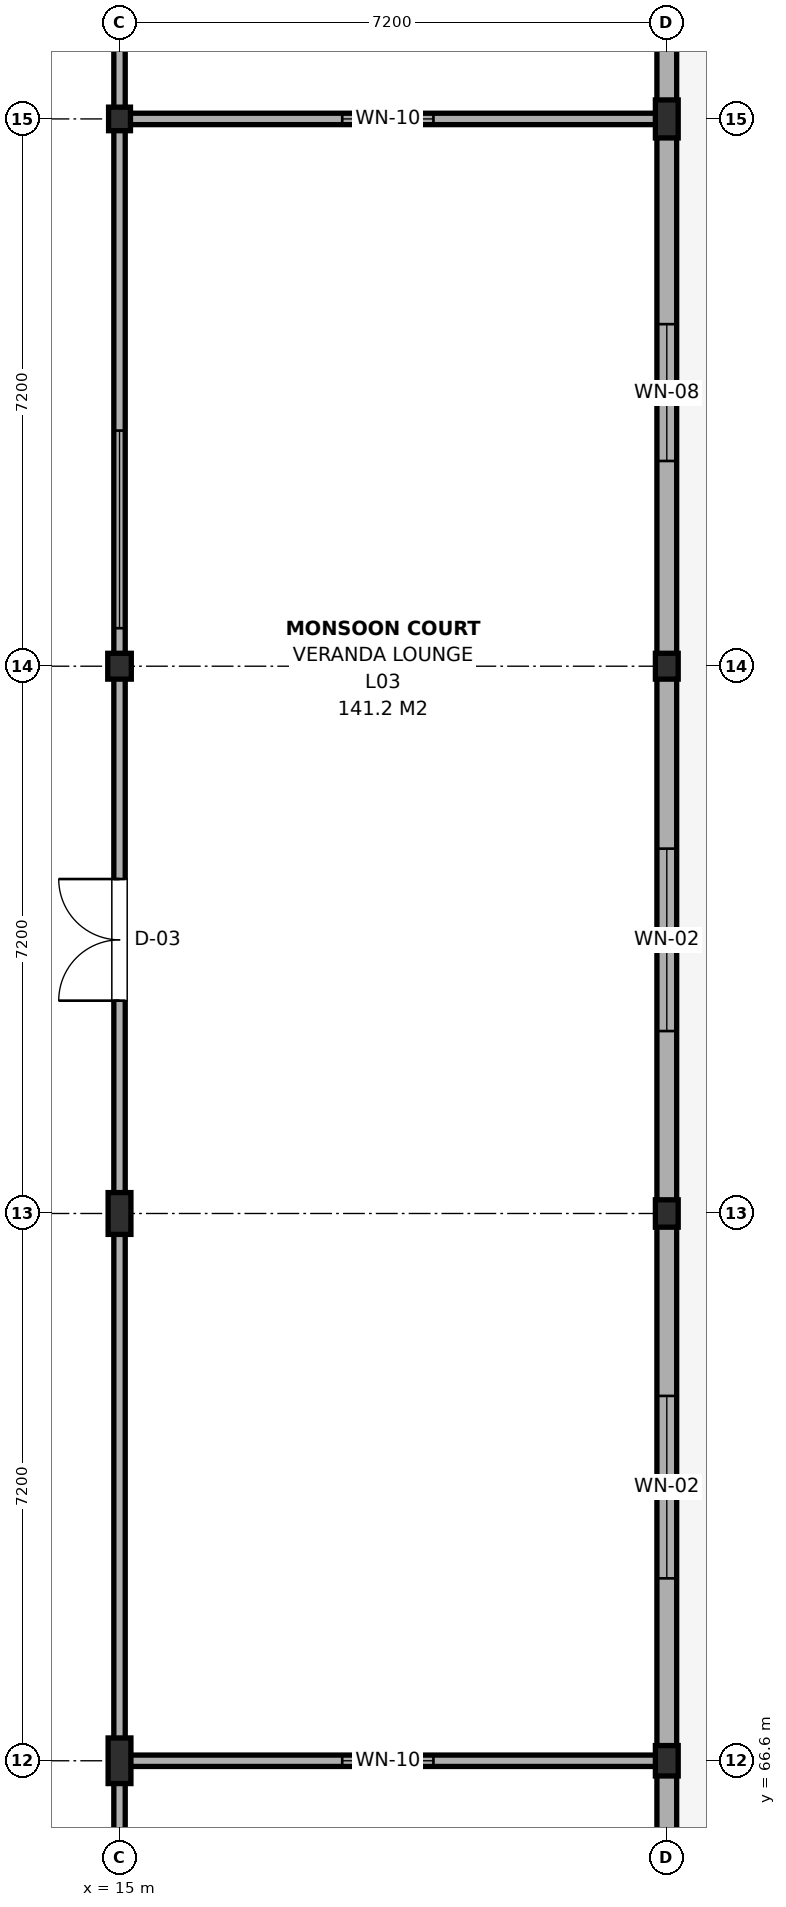
"""IFC4 building model, lengths in metres.
Left out: names, types, materials, properties, quantities, classifications, styles, units other than length and angle.
Written with IfcOpenShell. Run it as: python <this file> out.ifc"""

import sys

from ifc_helpers import new_model, si_unit, direction, frame, frame_2d, origin, origin_2d, place, context, subcontext, project, spatial, rectangle, i_section, extrude, element, fill, save


model = new_model("IFC4")
c1 = context("Model", 3, precision=1e-05, world=origin(), true_north=direction((0.0, 1.0)))
c2 = subcontext(c1, "Body", "Model", "MODEL_VIEW")
j1 = project(units=[si_unit("LENGTHUNIT", "METRE"), si_unit("PLANEANGLEUNIT", "RADIAN")], contexts=[c1])
p1 = place(None, origin())
s1 = spatial("IfcSite", under=j1, at=p1, CompositionType="ELEMENT")
p2 = place(p1, origin())
s2 = spatial("IfcBuilding", under=s1, at=p2, CompositionType="ELEMENT")
p3 = place(p2, frame((0.0, 0.0, 13.2)))
s3 = spatial("IfcBuildingStorey", under=s2, at=p3, CompositionType="ELEMENT", Elevation=13.2)
p4 = place(p3, frame((15.0, 66.6, 0.0), z_axis=(0.0, 0.0, 1.0), x_axis=(1.0, 0.0, 0.0)))
e1 = element("IfcColumn", 1, at=p4, inside=s3, PredefinedType="COLUMN", context=c2, shape_type="SweptSolid", body=[
    extrude(i_section(OverallWidth=0.3, OverallDepth=0.6, WebThickness=0.015, FlangeThickness=0.03, FilletRadius=0.027, at=origin_2d()), origin(), (0.0, 0.0, 1.0), 3.9),
])
p5 = place(p3, frame((15.0, 73.8, 0.0), z_axis=(0.0, 0.0, 1.0), x_axis=(1.0, 0.0, 0.0)))
e2 = element("IfcColumn", 2, at=p5, inside=s3, PredefinedType="COLUMN", context=c2, shape_type="SweptSolid", body=[
    extrude(i_section(OverallWidth=0.3, OverallDepth=0.55, WebThickness=0.015, FlangeThickness=0.029, FilletRadius=0.027, at=origin_2d()), origin(), (0.0, 0.0, 1.0), 3.9),
])
p6 = place(p3, frame((15.0, 81.0, 0.0), z_axis=(0.0, 0.0, 1.0), x_axis=(1.0, 0.0, 0.0)))
e3 = element("IfcColumn", 3, at=p6, inside=s3, PredefinedType="COLUMN", context=c2, shape_type="SweptSolid", body=[
    extrude(i_section(OverallWidth=0.31, OverallDepth=0.34, WebThickness=0.021, FlangeThickness=0.039, FilletRadius=0.027, at=origin_2d()), origin(), (0.0, 0.0, 1.0), 3.9),
])
p7 = place(p3, frame((15.0, 88.2, 0.0), z_axis=(0.0, 0.0, 1.0), x_axis=(1.0, 0.0, 0.0)))
e4 = element("IfcColumn", 4, at=p7, inside=s3, PredefinedType="COLUMN", context=c2, shape_type="SweptSolid", body=[
    extrude(i_section(OverallWidth=0.288, OverallDepth=0.31, WebThickness=0.019, FlangeThickness=0.033, FilletRadius=0.024, at=origin_2d()), origin(), (0.0, 0.0, 1.0), 3.9),
])
p8 = place(p3, frame((22.2, 66.6, 0.0), z_axis=(0.0, 0.0, 1.0), x_axis=(1.0, 0.0, 0.0)))
e5 = element("IfcColumn", 5, at=p8, inside=s3, PredefinedType="COLUMN", context=c2, shape_type="SweptSolid", body=[
    extrude(i_section(OverallWidth=0.3, OverallDepth=0.4, WebThickness=0.013, FlangeThickness=0.024, FilletRadius=0.027, at=origin_2d()), origin(), (0.0, 0.0, 1.0), 3.9),
])
p9 = place(p3, frame((22.2, 73.8, 0.0), z_axis=(0.0, 0.0, 1.0), x_axis=(1.0, 0.0, 0.0)))
e6 = element("IfcColumn", 6, at=p9, inside=s3, PredefinedType="COLUMN", context=c2, shape_type="SweptSolid", body=[
    extrude(i_section(OverallWidth=0.3, OverallDepth=0.36, WebThickness=0.012, FlangeThickness=0.022, FilletRadius=0.027, at=origin_2d()), origin(), (0.0, 0.0, 1.0), 3.9),
])
p10 = place(p3, frame((22.2, 81.0, 0.0), z_axis=(0.0, 0.0, 1.0), x_axis=(1.0, 0.0, 0.0)))
e7 = element("IfcColumn", 7, at=p10, inside=s3, PredefinedType="COLUMN", context=c2, shape_type="SweptSolid", body=[
    extrude(i_section(OverallWidth=0.3, OverallDepth=0.34, WebThickness=0.012, FlangeThickness=0.021, FilletRadius=0.027, at=origin_2d()), origin(), (0.0, 0.0, 1.0), 3.9),
])
p11 = place(p3, frame((22.2, 88.2, 0.0), z_axis=(0.0, 0.0, 1.0), x_axis=(1.0, 0.0, 0.0)))
e8 = element("IfcColumn", 8, at=p11, inside=s3, PredefinedType="COLUMN", context=c2, shape_type="SweptSolid", body=[
    extrude(i_section(OverallWidth=0.3, OverallDepth=0.5, WebThickness=0.014, FlangeThickness=0.028, FilletRadius=0.027, at=origin_2d()), origin(), (0.0, 0.0, 1.0), 3.9),
])
p12 = place(p3, frame((22.2, 58.8, 0.0), z_axis=(0.0, 0.0, 1.0), x_axis=(0.0, 1.0, 0.0)))
e9 = element("IfcWall", 9, at=p12, inside=s3, PredefinedType="SOLIDWALL", context=c2, shape_type="SweptSolid", body=[
    extrude(rectangle(XDim=7.8, YDim=0.26, at=frame_2d((3.9, 0.0))), origin(), (0.0, 0.0, 1.0), 3.145),
])
p13 = place(p12, frame((3.0, 0.0, 0.65)))
e10 = element("IfcOpeningElement", 10, at=p13, cuts=e9, PredefinedType="OPENING", context=c2, shape_type="SweptSolid", body=[
    extrude(rectangle(XDim=1.8, YDim=1.2, at=frame_2d((0.9, 0.6))), frame((0.0, 0.145, 0.0), z_axis=(0.0, -1.0, 0.0), x_axis=(1.0, 0.0, 0.0)), (0.0, 0.0, 1.0), 0.29),
])
p14 = place(p3, frame((22.2, 66.6, 0.0), z_axis=(0.0, 0.0, 1.0), x_axis=(0.0, 1.0, 0.0)))
e11 = element("IfcWall", 11, at=p14, inside=s3, PredefinedType="SOLIDWALL", context=c2, shape_type="SweptSolid", body=[
    extrude(rectangle(XDim=7.2, YDim=0.26, at=frame_2d((3.6, 0.0))), origin(), (0.0, 0.0, 1.0), 3.195),
])
p15 = place(p14, frame((2.4, 0.0, 0.9)))
e12 = element("IfcOpeningElement", 12, at=p15, cuts=e11, PredefinedType="OPENING", context=c2, shape_type="SweptSolid", body=[
    extrude(rectangle(XDim=2.4, YDim=2.1, at=frame_2d((1.2, 1.05))), frame((0.0, 0.145, 0.0), z_axis=(0.0, -1.0, 0.0), x_axis=(1.0, 0.0, 0.0)), (0.0, 0.0, 1.0), 0.29),
])
p16 = place(p3, frame((22.2, 73.8, 0.0), z_axis=(0.0, 0.0, 1.0), x_axis=(0.0, 1.0, 0.0)))
e13 = element("IfcWall", 13, at=p16, inside=s3, PredefinedType="SOLIDWALL", context=c2, shape_type="SweptSolid", body=[
    extrude(rectangle(XDim=7.2, YDim=0.26, at=frame_2d((3.6, 0.0))), origin(), (0.0, 0.0, 1.0), 3.245),
])
p17 = place(p16, frame((2.4, 0.0, 0.9)))
e14 = element("IfcOpeningElement", 14, at=p17, cuts=e13, PredefinedType="OPENING", context=c2, shape_type="SweptSolid", body=[
    extrude(rectangle(XDim=2.4, YDim=2.1, at=frame_2d((1.2, 1.05))), frame((0.0, 0.145, 0.0), z_axis=(0.0, -1.0, 0.0), x_axis=(1.0, 0.0, 0.0)), (0.0, 0.0, 1.0), 0.29),
])
p18 = place(p3, frame((22.2, 81.0, 0.0), z_axis=(0.0, 0.0, 1.0), x_axis=(0.0, 1.0, 0.0)))
e15 = element("IfcWall", 15, at=p18, inside=s3, PredefinedType="SOLIDWALL", context=c2, shape_type="SweptSolid", body=[
    extrude(rectangle(XDim=7.2, YDim=0.26, at=frame_2d((3.6, 0.0))), origin(), (0.0, 0.0, 1.0), 3.095),
])
p19 = place(p18, frame((2.7, 0.0, 0.65)))
e16 = element("IfcOpeningElement", 16, at=p19, cuts=e15, PredefinedType="OPENING", context=c2, shape_type="SweptSolid", body=[
    extrude(rectangle(XDim=1.8, YDim=1.2, at=frame_2d((0.9, 0.6))), frame((0.0, 0.145, 0.0), z_axis=(0.0, -1.0, 0.0), x_axis=(1.0, 0.0, 0.0)), (0.0, 0.0, 1.0), 0.29),
])
p20 = place(p3, frame((22.2, 88.2, 0.0), z_axis=(0.0, 0.0, 1.0), x_axis=(0.0, 1.0, 0.0)))
e17 = element("IfcWall", 17, at=p20, inside=s3, PredefinedType="SOLIDWALL", context=c2, shape_type="SweptSolid", body=[
    extrude(rectangle(XDim=7.8, YDim=0.26, at=frame_2d((3.9, 0.0))), origin(), (0.0, 0.0, 1.0), 3.095),
])
p21 = place(p20, frame((3.0, 0.0, 0.65)))
e18 = element("IfcOpeningElement", 18, at=p21, cuts=e17, PredefinedType="OPENING", context=c2, shape_type="SweptSolid", body=[
    extrude(rectangle(XDim=1.8, YDim=1.2, at=frame_2d((0.9, 0.6))), frame((0.0, 0.145, 0.0), z_axis=(0.0, -1.0, 0.0), x_axis=(1.0, 0.0, 0.0)), (0.0, 0.0, 1.0), 0.29),
])
p22 = place(p3, frame((15.0, 42.0, 0.0), z_axis=(0.0, 0.0, 1.0), x_axis=(0.0, 1.0, 0.0)))
e19 = element("IfcWall", 19, at=p22, inside=s3, PredefinedType="PARTITIONING", context=c2, shape_type="SweptSolid", body=[
    extrude(rectangle(XDim=24.6, YDim=0.15, at=frame_2d((12.3, 0.0))), origin(), (0.0, 0.0, 1.0), 3.095),
])
p23 = place(p22, frame((11.5, 0.0, 0.0)))
e20 = element("IfcOpeningElement", 20, at=p23, cuts=e19, PredefinedType="OPENING", context=c2, shape_type="SweptSolid", body=[
    extrude(rectangle(XDim=1.6, YDim=2.15, at=frame_2d((0.8, 1.075))), frame((0.0, 0.09, 0.0), z_axis=(0.0, -1.0, 0.0), x_axis=(1.0, 0.0, 0.0)), (0.0, 0.0, 1.0), 0.18),
])
p24 = place(p3, frame((15.0, 66.6, 0.0), z_axis=(0.0, 0.0, 1.0), x_axis=(0.0, 1.0, 0.0)))
e21 = element("IfcWall", 21, at=p24, inside=s3, PredefinedType="PARTITIONING", context=c2, shape_type="SweptSolid", body=[
    extrude(rectangle(XDim=21.6, YDim=0.15, at=frame_2d((10.8, 0.0))), origin(), (0.0, 0.0, 1.0), 3.095),
])
p25 = place(p24, frame((10.0, 0.0, 0.0)))
e22 = element("IfcOpeningElement", 22, at=p25, cuts=e21, PredefinedType="OPENING", context=c2, shape_type="SweptSolid", body=[
    extrude(rectangle(XDim=1.6, YDim=2.15, at=frame_2d((0.8, 1.075))), frame((0.0, 0.09, 0.0), z_axis=(0.0, -1.0, 0.0), x_axis=(1.0, 0.0, 0.0)), (0.0, 0.0, 1.0), 0.18),
])
p26 = place(p24, frame((14.9, 0.0, 0.95)))
e23 = element("IfcOpeningElement", 23, at=p26, cuts=e21, PredefinedType="OPENING", context=c2, shape_type="SweptSolid", body=[
    extrude(rectangle(XDim=2.6, YDim=1.5, at=frame_2d((1.3, 0.75))), frame((0.0, 0.09, 0.0), z_axis=(0.0, -1.0, 0.0), x_axis=(1.0, 0.0, 0.0)), (0.0, 0.0, 1.0), 0.18),
])
p27 = place(p3, frame((15.0, 66.6, 0.0), z_axis=(0.0, 0.0, 1.0), x_axis=(1.0, 0.0, 0.0)))
e24 = element("IfcWall", 24, at=p27, inside=s3, PredefinedType="PARTITIONING", context=c2, shape_type="SweptSolid", body=[
    extrude(rectangle(XDim=7.06, YDim=0.15, at=frame_2d((3.53, 0.0))), origin(), (0.0, 0.0, 1.0), 3.145),
])
p28 = place(p27, frame((2.93, 0.0, 0.95)))
e25 = element("IfcOpeningElement", 25, at=p28, cuts=e24, PredefinedType="OPENING", context=c2, shape_type="SweptSolid", body=[
    extrude(rectangle(XDim=1.2, YDim=1.5, at=frame_2d((0.6, 0.75))), frame((0.0, 0.09, 0.0), z_axis=(0.0, -1.0, 0.0), x_axis=(1.0, 0.0, 0.0)), (0.0, 0.0, 1.0), 0.18),
])
p29 = place(p3, frame((15.0, 88.2, 0.0), z_axis=(0.0, 0.0, 1.0), x_axis=(0.0, 1.0, 0.0)))
e26 = element("IfcWall", 26, at=p29, inside=s3, PredefinedType="PARTITIONING", context=c2, shape_type="SweptSolid", body=[
    extrude(rectangle(XDim=25.2, YDim=0.15, at=frame_2d((12.6, 0.0))), origin(), (0.0, 0.0, 1.0), 3.105),
])
p30 = place(p29, frame((12.075, 0.0, 0.0)))
e27 = element("IfcOpeningElement", 27, at=p30, cuts=e26, PredefinedType="OPENING", context=c2, shape_type="SweptSolid", body=[
    extrude(rectangle(XDim=1.05, YDim=2.15, at=frame_2d((0.525, 1.075))), frame((0.0, 0.09, 0.0), z_axis=(0.0, -1.0, 0.0), x_axis=(1.0, 0.0, 0.0)), (0.0, 0.0, 1.0), 0.18),
])
p31 = place(p29, frame((17.6, 0.0, 0.95)))
e28 = element("IfcOpeningElement", 28, at=p31, cuts=e26, PredefinedType="OPENING", context=c2, shape_type="SweptSolid", body=[
    extrude(rectangle(XDim=2.6, YDim=1.5, at=frame_2d((1.3, 0.75))), frame((0.0, 0.09, 0.0), z_axis=(0.0, -1.0, 0.0), x_axis=(1.0, 0.0, 0.0)), (0.0, 0.0, 1.0), 0.18),
])
p32 = place(p3, frame((15.0, 88.2, 0.0), z_axis=(0.0, 0.0, 1.0), x_axis=(1.0, 0.0, 0.0)))
e29 = element("IfcWall", 29, at=p32, inside=s3, PredefinedType="PARTITIONING", context=c2, shape_type="SweptSolid", body=[
    extrude(rectangle(XDim=7.06, YDim=0.15, at=frame_2d((3.53, 0.0))), origin(), (0.0, 0.0, 1.0), 3.145),
])
p33 = place(p32, frame((2.93, 0.0, 0.95)))
e30 = element("IfcOpeningElement", 30, at=p33, cuts=e29, PredefinedType="OPENING", context=c2, shape_type="SweptSolid", body=[
    extrude(rectangle(XDim=1.2, YDim=1.5, at=frame_2d((0.6, 0.75))), frame((0.0, 0.09, 0.0), z_axis=(0.0, -1.0, 0.0), x_axis=(1.0, 0.0, 0.0)), (0.0, 0.0, 1.0), 0.18),
])
p34 = place(p15, origin())
e31 = element("IfcWindow", 31, at=p34, inside=s3, PartitioningType="SINGLE_PANEL", PredefinedType="WINDOW", context=c2, shape_type="SweptSolid", body=[
    extrude(rectangle(XDim=2.4, YDim=2.1, at=frame_2d((1.2, 1.05))), frame((0.0, 0.03, 0.0), z_axis=(0.0, -1.0, 0.0), x_axis=(1.0, 0.0, 0.0)), (0.0, 0.0, 1.0), 0.06),
])
fill(e12, e31)
p35 = place(p17, origin())
e32 = element("IfcWindow", 32, at=p35, inside=s3, PartitioningType="SINGLE_PANEL", PredefinedType="WINDOW", context=c2, shape_type="SweptSolid", body=[
    extrude(rectangle(XDim=2.4, YDim=2.1, at=frame_2d((1.2, 1.05))), frame((0.0, 0.03, 0.0), z_axis=(0.0, -1.0, 0.0), x_axis=(1.0, 0.0, 0.0)), (0.0, 0.0, 1.0), 0.06),
])
fill(e14, e32)
p36 = place(p19, origin())
e33 = element("IfcWindow", 33, at=p36, inside=s3, PartitioningType="SINGLE_PANEL", PredefinedType="WINDOW", context=c2, shape_type="SweptSolid", body=[
    extrude(rectangle(XDim=1.8, YDim=1.2, at=frame_2d((0.9, 0.6))), frame((0.0, 0.03, 0.0), z_axis=(0.0, -1.0, 0.0), x_axis=(1.0, 0.0, 0.0)), (0.0, 0.0, 1.0), 0.06),
])
fill(e16, e33)
p37 = place(p25, origin())
e34 = element("IfcDoor", 34, at=p37, inside=s3, OperationType="DOUBLE_DOOR_SINGLE_SWING", PredefinedType="DOOR", context=c2, shape_type="SweptSolid", body=[
    extrude(rectangle(XDim=1.6, YDim=2.15, at=frame_2d((0.8, 1.075))), frame((0.0, 0.025, 0.0), z_axis=(0.0, -1.0, 0.0), x_axis=(1.0, 0.0, 0.0)), (0.0, 0.0, 1.0), 0.05),
])
fill(e22, e34)
p38 = place(p26, origin())
e35 = element("IfcWindow", 35, at=p38, inside=s3, PartitioningType="SINGLE_PANEL", PredefinedType="WINDOW", context=c2, shape_type="SweptSolid", body=[
    extrude(rectangle(XDim=2.6, YDim=1.5, at=frame_2d((1.3, 0.75))), frame((0.0, 0.03, 0.0), z_axis=(0.0, -1.0, 0.0), x_axis=(1.0, 0.0, 0.0)), (0.0, 0.0, 1.0), 0.06),
])
fill(e23, e35)
p39 = place(p28, origin())
e36 = element("IfcWindow", 36, at=p39, inside=s3, PartitioningType="SINGLE_PANEL", PredefinedType="WINDOW", context=c2, shape_type="SweptSolid", body=[
    extrude(rectangle(XDim=1.2, YDim=1.5, at=frame_2d((0.6, 0.75))), frame((0.0, 0.03, 0.0), z_axis=(0.0, -1.0, 0.0), x_axis=(1.0, 0.0, 0.0)), (0.0, 0.0, 1.0), 0.06),
])
fill(e25, e36)
p40 = place(p33, origin())
e37 = element("IfcWindow", 37, at=p40, inside=s3, PartitioningType="SINGLE_PANEL", PredefinedType="WINDOW", context=c2, shape_type="SweptSolid", body=[
    extrude(rectangle(XDim=1.2, YDim=1.5, at=frame_2d((0.6, 0.75))), frame((0.0, 0.03, 0.0), z_axis=(0.0, -1.0, 0.0), x_axis=(1.0, 0.0, 0.0)), (0.0, 0.0, 1.0), 0.06),
])
fill(e30, e37)
save(model, sys.argv[1])
